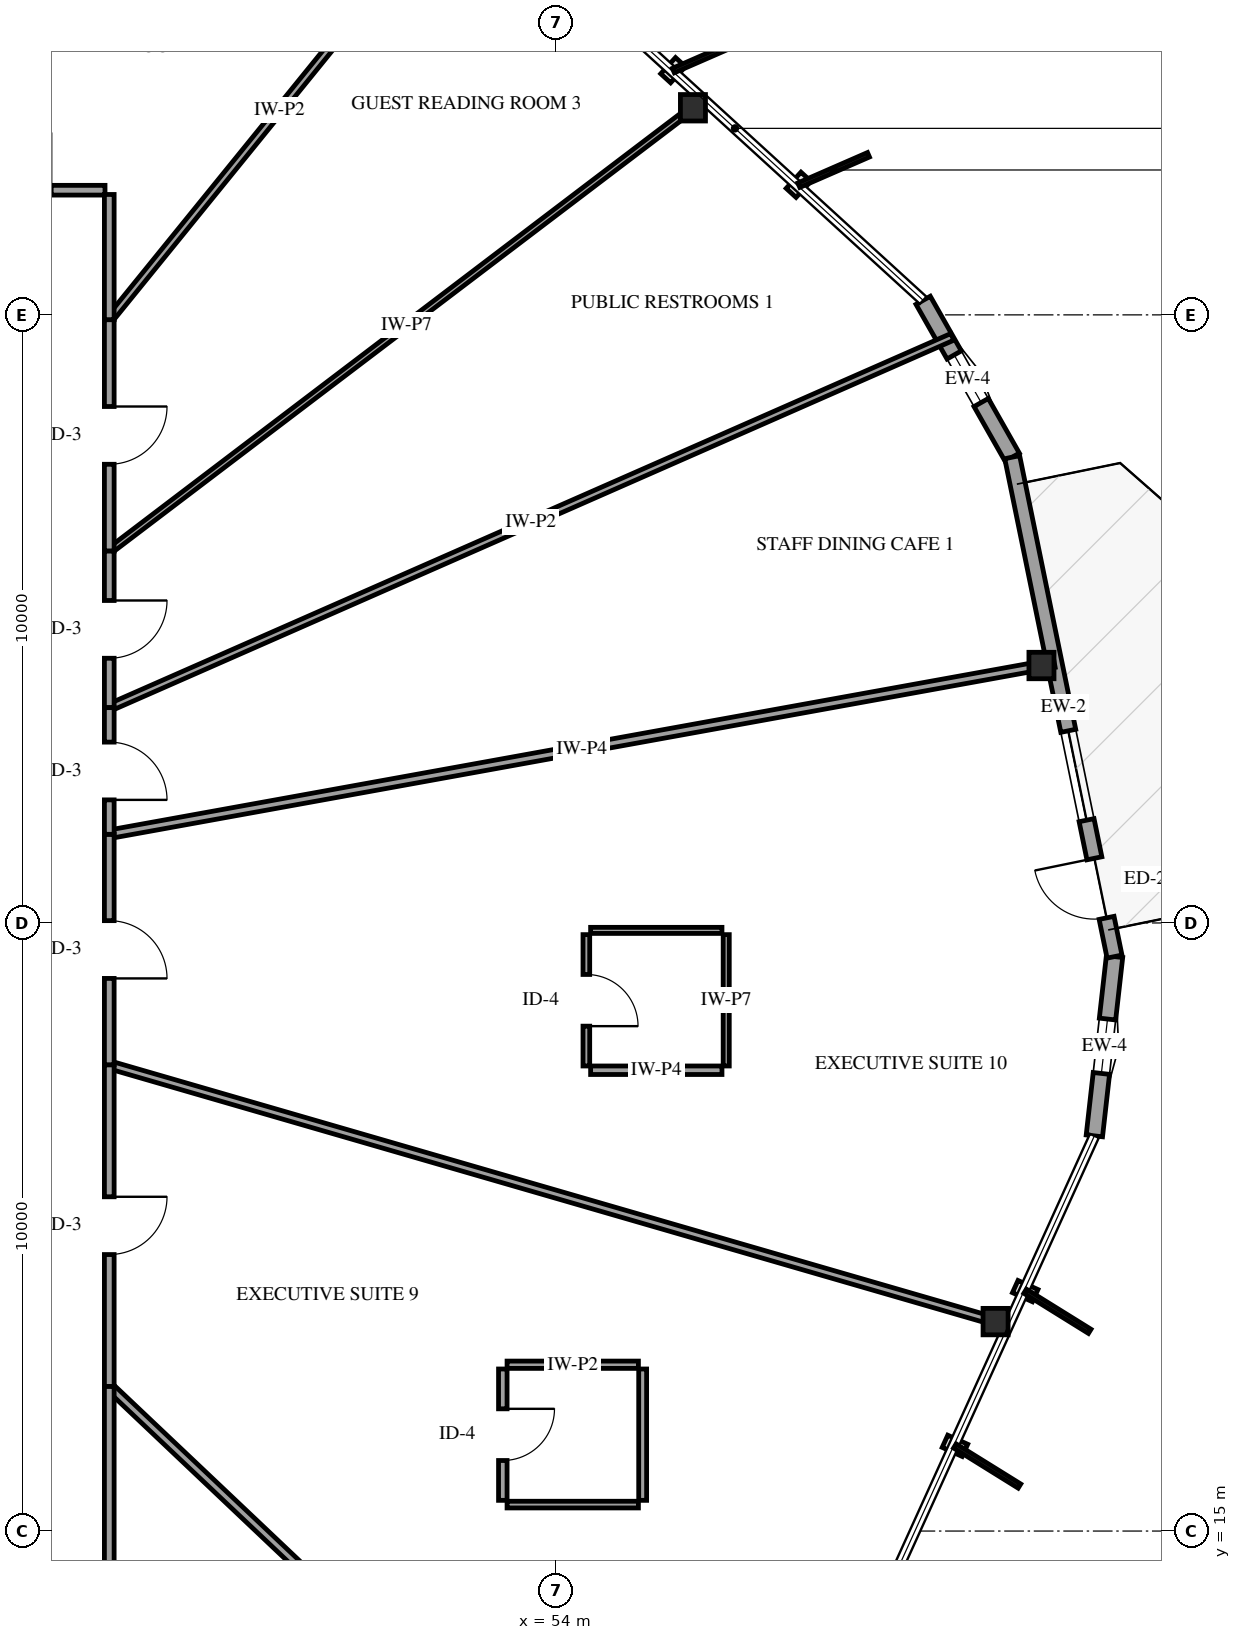
"""IFC4 building model, lengths in metres.
Left out: names, types, materials, properties, quantities, classifications, styles, units other than length and angle.
Written with IfcOpenShell. Run it as: python <this file> out.ifc"""

import sys

from ifc_helpers import new_model, si_unit, direction, frame, frame_2d, origin, origin_2d, place, context, subcontext, project, spatial, rectangle, i_section, extrude, element, fill, save


model = new_model("IFC4")
c1 = context("Model", 3, precision=1e-05, world=origin(), true_north=direction((0.0, 1.0)))
c2 = subcontext(c1, "Body", "Model", "MODEL_VIEW")
j1 = project(units=[si_unit("LENGTHUNIT", "METRE"), si_unit("PLANEANGLEUNIT", "RADIAN")], contexts=[c1])
p1 = place(None, origin())
s1 = spatial("IfcSite", under=j1, at=p1, CompositionType="ELEMENT")
p2 = place(p1, origin())
s2 = spatial("IfcBuilding", under=s1, at=p2, CompositionType="ELEMENT")
p3 = place(p2, frame((0.0, 0.0, 142.6)))
s3 = spatial("IfcBuildingStorey", under=s2, at=p3, CompositionType="ELEMENT", Elevation=142.6)
for number, where, z_axis, x_axis in (
    (1, (61.98, 29.234, 0.0), (0.0, 0.0, 1.0), (1.0, 0.0, 0.0)),
    (2, (56.249, 38.406, 0.0), (0.0, 0.0, 1.0), (1.0, 0.0, 0.0)),
    (3, (61.226, 18.444, 0.0), (0.0, 0.0, 1.0), (1.0, 0.0, 0.0)),
):
    element("IfcColumn", number, at=place(p3, frame(where, z_axis=z_axis, x_axis=x_axis)), inside=s3, PredefinedType="COLUMN", context=c2, shape_type="SweptSolid", body=[
        extrude(i_section(OverallWidth=0.412, OverallDepth=0.435, WebThickness=0.036, FlangeThickness=0.057, FilletRadius=0.038, at=origin_2d()), origin(), (0.0, 0.0, 1.0), 3.6),
    ])
p4 = place(p3, frame((62.85, 21.499, 0.0), z_axis=(0.0, 0.0, 1.0), x_axis=(0.111840485986, 0.993726172391, 0.0)))
e4 = element("IfcWall", 4, at=p4, inside=s3, PredefinedType="SOLIDWALL", context=c2, shape_type="SweptSolid", body=[
    extrude(rectangle(XDim=2.967, YDim=0.27, at=frame_2d((1.483, 0.0))), origin(), (0.0, 0.0, 1.0), 2.679),
])
p5 = place(p4, frame((1.033, 0.0, 0.75)))
e5 = element("IfcOpeningElement", 5, at=p5, cuts=e4, PredefinedType="OPENING", context=c2, shape_type="SweptSolid", body=[
    extrude(rectangle(XDim=0.9, YDim=1.5, at=frame_2d((0.45, 0.75))), frame((0.0, 0.145, 0.0), z_axis=(0.0, -1.0, 0.0), x_axis=(1.0, 0.0, 0.0)), (0.0, 0.0, 1.0), 0.29),
])
p6 = place(p3, frame((61.499, 32.66, 0.0), z_axis=(0.0, 0.0, 1.0), x_axis=(-0.493637484398, 0.869667772196, 0.0)))
e6 = element("IfcWall", 6, at=p6, inside=s3, PredefinedType="SOLIDWALL", context=c2, shape_type="SweptSolid", body=[
    extrude(rectangle(XDim=2.967, YDim=0.27, at=frame_2d((1.483, 0.0))), origin(), (0.0, 0.0, 1.0), 2.679),
])
p7 = place(p6, frame((1.033, 0.0, 0.75)))
e7 = element("IfcOpeningElement", 7, at=p7, cuts=e6, PredefinedType="OPENING", context=c2, shape_type="SweptSolid", body=[
    extrude(rectangle(XDim=0.9, YDim=1.5, at=frame_2d((0.45, 0.75))), frame((0.0, 0.145, 0.0), z_axis=(0.0, -1.0, 0.0), x_axis=(1.0, 0.0, 0.0)), (0.0, 0.0, 1.0), 0.29),
])
p8 = place(p3, frame((63.182, 24.447, 0.0), z_axis=(0.0, 0.0, 1.0), x_axis=(-0.200734189033, 0.979645744825, 0.0)))
e8 = element("IfcWall", 8, at=p8, inside=s3, PredefinedType="SOLIDWALL", context=c2, shape_type="SweptSolid", body=[
    extrude(rectangle(XDim=8.384, YDim=0.25, at=frame_2d((4.192, 0.0))), origin(), (0.0, 0.0, 1.0), 2.679),
])
p9 = place(p8, frame((0.65, 0.0, 0.0)))
e9 = element("IfcOpeningElement", 9, at=p9, cuts=e8, PredefinedType="OPENING", context=c2, shape_type="SweptSolid", body=[
    extrude(rectangle(XDim=1.0, YDim=2.15, at=frame_2d((0.5, 1.075))), frame((0.0, 0.135, 0.0), z_axis=(0.0, -1.0, 0.0), x_axis=(1.0, 0.0, 0.0)), (0.0, 0.0, 1.0), 0.27),
])
p10 = place(p8, frame((2.29, 0.0, 0.72)))
e10 = element("IfcOpeningElement", 10, at=p10, cuts=e8, PredefinedType="OPENING", context=c2, shape_type="SweptSolid", body=[
    extrude(rectangle(XDim=1.5, YDim=1.7, at=frame_2d((0.75, 0.85))), frame((0.0, 0.135, 0.0), z_axis=(0.0, -1.0, 0.0), x_axis=(1.0, 0.0, 0.0)), (0.0, 0.0, 1.0), 0.27),
])
p11 = place(p3, frame((62.193, 29.272, 0.0), z_axis=(0.0, 0.0, 1.0), x_axis=(-0.98400416062, -0.178145479546, 0.0)))
e11 = element("IfcWall", 11, at=p11, inside=s3, PredefinedType="PARTITIONING", context=c2, shape_type="SweptSolid", body=[
    extrude(rectangle(XDim=15.796, YDim=0.14, at=frame_2d((7.898, 0.0))), origin(), (0.0, 0.0, 1.0), 2.595),
])
p12 = place(p3, frame((46.65, 22.668, 0.0), z_axis=(0.0, 0.0, 1.0), x_axis=(0.9604993623, -0.278282185957, 0.0)))
e12 = element("IfcWall", 12, at=p12, inside=s3, PredefinedType="PARTITIONING", context=c2, shape_type="SweptSolid", body=[
    extrude(rectangle(XDim=15.394, YDim=0.13, at=frame_2d((7.697, 0.0))), origin(), (0.0, 0.0, 1.0), 3.3),
])
p13 = place(p3, frame((46.65, 28.541, 0.0), z_axis=(0.0, 0.0, 1.0), x_axis=(0.915393928304, 0.40255925778, 0.0)))
e13 = element("IfcWall", 13, at=p13, inside=s3, PredefinedType="PARTITIONING", context=c2, shape_type="SweptSolid", body=[
    extrude(rectangle(XDim=15.146, YDim=0.12, at=frame_2d((7.573, 0.0))), origin(), (0.0, 0.0, 1.0), 3.3),
])
p14 = place(p3, frame((46.65, 31.115, 0.0), z_axis=(0.0, 0.0, 1.0), x_axis=(0.796330811918, 0.60486133782, 0.0)))
e14 = element("IfcWall", 14, at=p14, inside=s3, PredefinedType="PARTITIONING", context=c2, shape_type="SweptSolid", body=[
    extrude(rectangle(XDim=12.274, YDim=0.1, at=frame_2d((6.137, 0.0))), origin(), (0.0, 0.0, 1.0), 3.3),
])
p15 = place(p3, frame((46.65, 17.377, 0.0), z_axis=(0.0, 0.0, 1.0), x_axis=(0.726191917905, -0.687492035132, 0.0)))
e15 = element("IfcWall", 15, at=p15, inside=s3, PredefinedType="PARTITIONING", context=c2, shape_type="SweptSolid", body=[
    extrude(rectangle(XDim=10.725, YDim=0.14, at=frame_2d((5.362, 0.0))), origin(), (0.0, 0.0, 1.0), 2.595),
])
p16 = place(p3, frame((46.65, 34.921, 0.0), z_axis=(0.0, 0.0, 1.0), x_axis=(0.630130936526, 0.776488894211, 0.0)))
e16 = element("IfcWall", 16, at=p16, inside=s3, PredefinedType="PARTITIONING", context=c2, shape_type="SweptSolid", body=[
    extrude(rectangle(XDim=8.881, YDim=0.12, at=frame_2d((4.44, 0.0))), origin(), (0.0, 0.0, 1.0), 2.678),
])
p17 = place(p3, frame((43.86, 37.05, 0.0), z_axis=(0.0, 0.0, 1.0), x_axis=(0.400047313653, 0.916494488166, 0.0)))
e17 = element("IfcWall", 17, at=p17, inside=s3, PredefinedType="PARTITIONING", context=c2, shape_type="SweptSolid", body=[
    extrude(rectangle(XDim=6.127, YDim=0.14, at=frame_2d((3.063, 0.0))), origin(), (0.0, 0.0, 1.0), 2.595),
])
p18 = place(p3, frame((46.65, 22.668, 0.0), z_axis=(0.0, 0.0, 1.0), x_axis=(0.0, -1.0, 0.0)))
e18 = element("IfcWall", 18, at=p18, inside=s3, PredefinedType="PARTITIONING", context=c2, shape_type="SweptSolid", body=[
    extrude(rectangle(XDim=5.291, YDim=0.16, at=frame_2d((2.646, 0.0))), origin(), (0.0, 0.0, 1.0), 3.3),
])
p19 = place(p18, frame((2.171, 0.0, 0.0)))
e19 = element("IfcOpeningElement", 19, at=p19, cuts=e18, PredefinedType="OPENING", context=c2, shape_type="SweptSolid", body=[
    extrude(rectangle(XDim=0.95, YDim=2.15, at=frame_2d((0.475, 1.075))), frame((0.0, 0.09, 0.0), z_axis=(0.0, -1.0, 0.0), x_axis=(1.0, 0.0, 0.0)), (0.0, 0.0, 1.0), 0.18),
])
p20 = place(p3, frame((46.65, 17.377, 0.0), z_axis=(0.0, 0.0, 1.0), x_axis=(0.0, -1.0, 0.0)))
e20 = element("IfcWall", 20, at=p20, inside=s3, PredefinedType="PARTITIONING", context=c2, shape_type="SweptSolid", body=[
    extrude(rectangle(XDim=4.357, YDim=0.16, at=frame_2d((2.178, 0.0))), origin(), (0.0, 0.0, 1.0), 3.3),
])
p21 = place(p3, frame((46.65, 34.921, 0.0), z_axis=(0.0, 0.0, 1.0), x_axis=(0.0, -1.0, 0.0)))
e21 = element("IfcWall", 21, at=p21, inside=s3, PredefinedType="PARTITIONING", context=c2, shape_type="SweptSolid", body=[
    extrude(rectangle(XDim=3.806, YDim=0.16, at=frame_2d((1.903, 0.0))), origin(), (0.0, 0.0, 1.0), 3.3),
])
p22 = place(p21, frame((1.428, 0.0, 0.0)))
e22 = element("IfcOpeningElement", 22, at=p22, cuts=e21, PredefinedType="OPENING", context=c2, shape_type="SweptSolid", body=[
    extrude(rectangle(XDim=0.95, YDim=2.15, at=frame_2d((0.475, 1.075))), frame((0.0, 0.09, 0.0), z_axis=(0.0, -1.0, 0.0), x_axis=(1.0, 0.0, 0.0)), (0.0, 0.0, 1.0), 0.18),
])
p23 = place(p3, frame((46.65, 26.458, 0.0), z_axis=(0.0, 0.0, 1.0), x_axis=(0.0, -1.0, 0.0)))
e23 = element("IfcWall", 23, at=p23, inside=s3, PredefinedType="PARTITIONING", context=c2, shape_type="SweptSolid", body=[
    extrude(rectangle(XDim=3.79, YDim=0.16, at=frame_2d((1.895, 0.0))), origin(), (0.0, 0.0, 1.0), 3.3),
])
p24 = place(p23, frame((1.42, 0.0, 0.0)))
e24 = element("IfcOpeningElement", 24, at=p24, cuts=e23, PredefinedType="OPENING", context=c2, shape_type="SweptSolid", body=[
    extrude(rectangle(XDim=0.95, YDim=2.15, at=frame_2d((0.475, 1.075))), frame((0.0, 0.09, 0.0), z_axis=(0.0, -1.0, 0.0), x_axis=(1.0, 0.0, 0.0)), (0.0, 0.0, 1.0), 0.18),
])
p25 = place(p3, frame((43.86, 37.05, 0.0), z_axis=(0.0, 0.0, 1.0), x_axis=(1.0, 0.0, 0.0)))
e25 = element("IfcWall", 25, at=p25, inside=s3, PredefinedType="PARTITIONING", context=c2, shape_type="SweptSolid", body=[
    extrude(rectangle(XDim=2.72, YDim=0.16, at=frame_2d((1.36, 0.0))), origin(), (0.0, 0.0, 1.0), 3.3),
])
p26 = place(p25, frame((0.885, 0.0, 0.0)))
e26 = element("IfcOpeningElement", 26, at=p26, cuts=e25, PredefinedType="OPENING", context=c2, shape_type="SweptSolid", body=[
    extrude(rectangle(XDim=0.95, YDim=2.15, at=frame_2d((0.475, 1.075))), frame((0.0, 0.09, 0.0), z_axis=(0.0, -1.0, 0.0), x_axis=(1.0, 0.0, 0.0)), (0.0, 0.0, 1.0), 0.18),
])
p27 = place(p3, frame((46.65, 31.115, 0.0), z_axis=(0.0, 0.0, 1.0), x_axis=(0.0, -1.0, 0.0)))
e27 = element("IfcWall", 27, at=p27, inside=s3, PredefinedType="PARTITIONING", context=c2, shape_type="SweptSolid", body=[
    extrude(rectangle(XDim=2.574, YDim=0.16, at=frame_2d((1.287, 0.0))), origin(), (0.0, 0.0, 1.0), 3.3),
])
p28 = place(p27, frame((0.812, 0.0, 0.0)))
e28 = element("IfcOpeningElement", 28, at=p28, cuts=e27, PredefinedType="OPENING", context=c2, shape_type="SweptSolid", body=[
    extrude(rectangle(XDim=0.95, YDim=2.15, at=frame_2d((0.475, 1.075))), frame((0.0, 0.09, 0.0), z_axis=(0.0, -1.0, 0.0), x_axis=(1.0, 0.0, 0.0)), (0.0, 0.0, 1.0), 0.18),
])
p29 = place(p3, frame((54.496, 24.808, 0.0), z_axis=(0.0, 0.0, 1.0), x_axis=(0.0, -1.0, 0.0)))
e29 = element("IfcWall", 29, at=p29, inside=s3, PredefinedType="PARTITIONING", context=c2, shape_type="SweptSolid", body=[
    extrude(rectangle(XDim=2.16, YDim=0.11, at=frame_2d((1.08, 0.0))), origin(), (0.0, 0.0, 1.0), 3.3),
])
p30 = place(p29, frame((0.655, 0.0, 0.0)))
e30 = element("IfcOpeningElement", 30, at=p30, cuts=e29, PredefinedType="OPENING", context=c2, shape_type="SweptSolid", body=[
    extrude(rectangle(XDim=0.85, YDim=2.1, at=frame_2d((0.425, 1.05))), frame((0.0, 0.065, 0.0), z_axis=(0.0, -1.0, 0.0), x_axis=(1.0, 0.0, 0.0)), (0.0, 0.0, 1.0), 0.13),
])
p31 = place(p3, frame((56.796, 22.648, 0.0), z_axis=(0.0, 0.0, 1.0), x_axis=(0.0, 1.0, 0.0)))
e31 = element("IfcWall", 31, at=p31, inside=s3, PredefinedType="PARTITIONING", context=c2, shape_type="SweptSolid", body=[
    extrude(rectangle(XDim=2.16, YDim=0.1, at=frame_2d((1.08, 0.0))), origin(), (0.0, 0.0, 1.0), 3.3),
])
p32 = place(p3, frame((53.122, 17.665, 0.0), z_axis=(0.0, 0.0, 1.0), x_axis=(0.0, -1.0, 0.0)))
e32 = element("IfcWall", 32, at=p32, inside=s3, PredefinedType="PARTITIONING", context=c2, shape_type="SweptSolid", body=[
    extrude(rectangle(XDim=2.16, YDim=0.14, at=frame_2d((1.08, 0.0))), origin(), (0.0, 0.0, 1.0), 3.3),
])
p33 = place(p32, frame((0.655, 0.0, 0.0)))
e33 = element("IfcOpeningElement", 33, at=p33, cuts=e32, PredefinedType="OPENING", context=c2, shape_type="SweptSolid", body=[
    extrude(rectangle(XDim=0.85, YDim=2.1, at=frame_2d((0.425, 1.05))), frame((0.0, 0.08, 0.0), z_axis=(0.0, -1.0, 0.0), x_axis=(1.0, 0.0, 0.0)), (0.0, 0.0, 1.0), 0.16),
])
p34 = place(p3, frame((55.422, 15.505, 0.0), z_axis=(0.0, 0.0, 1.0), x_axis=(0.0, 1.0, 0.0)))
e34 = element("IfcWall", 34, at=p34, inside=s3, PredefinedType="PARTITIONING", context=c2, shape_type="SweptSolid", body=[
    extrude(rectangle(XDim=2.16, YDim=0.13, at=frame_2d((1.08, 0.0))), origin(), (0.0, 0.0, 1.0), 3.3),
])
p35 = place(p3, frame((55.352, 17.735, 0.0), z_axis=(0.0, 0.0, 1.0), x_axis=(-1.0, 0.0, 0.0)))
e35 = element("IfcWall", 35, at=p35, inside=s3, PredefinedType="PARTITIONING", context=c2, shape_type="SweptSolid", body=[
    extrude(rectangle(XDim=2.16, YDim=0.12, at=frame_2d((1.08, 0.0))), origin(), (0.0, 0.0, 1.0), 3.3),
])
p36 = place(p3, frame((53.192, 15.435, 0.0), z_axis=(0.0, 0.0, 1.0), x_axis=(1.0, 0.0, 0.0)))
e36 = element("IfcWall", 36, at=p36, inside=s3, PredefinedType="PARTITIONING", context=c2, shape_type="SweptSolid", body=[
    extrude(rectangle(XDim=2.16, YDim=0.11, at=frame_2d((1.08, 0.0))), origin(), (0.0, 0.0, 1.0), 3.3),
])
p37 = place(p3, frame((56.726, 24.878, 0.0), z_axis=(0.0, 0.0, 1.0), x_axis=(-1.0, 0.0, 0.0)))
e37 = element("IfcWall", 37, at=p37, inside=s3, PredefinedType="PARTITIONING", context=c2, shape_type="SweptSolid", body=[
    extrude(rectangle(XDim=2.16, YDim=0.1, at=frame_2d((1.08, 0.0))), origin(), (0.0, 0.0, 1.0), 3.3),
])
p38 = place(p3, frame((54.566, 22.578, 0.0), z_axis=(0.0, 0.0, 1.0), x_axis=(1.0, 0.0, 0.0)))
e38 = element("IfcWall", 38, at=p38, inside=s3, PredefinedType="PARTITIONING", context=c2, shape_type="SweptSolid", body=[
    extrude(rectangle(XDim=2.16, YDim=0.14, at=frame_2d((1.08, 0.0))), origin(), (0.0, 0.0, 1.0), 3.3),
])
p39 = place(p3, frame((46.65, 28.541, 0.0), z_axis=(0.0, 0.0, 1.0), x_axis=(0.0, -1.0, 0.0)))
e39 = element("IfcWall", 39, at=p39, inside=s3, PredefinedType="PARTITIONING", context=c2, shape_type="SweptSolid", body=[
    extrude(rectangle(XDim=2.083, YDim=0.16, at=frame_2d((1.042, 0.0))), origin(), (0.0, 0.0, 1.0), 3.3),
])
p40 = place(p39, frame((0.567, 0.0, 0.0)))
e40 = element("IfcOpeningElement", 40, at=p40, cuts=e39, PredefinedType="OPENING", context=c2, shape_type="SweptSolid", body=[
    extrude(rectangle(XDim=0.95, YDim=2.15, at=frame_2d((0.475, 1.075))), frame((0.0, 0.09, 0.0), z_axis=(0.0, -1.0, 0.0), x_axis=(1.0, 0.0, 0.0)), (0.0, 0.0, 1.0), 0.18),
])
p41 = place(p3, frame((46.65, 36.98, 0.0), z_axis=(0.0, 0.0, 1.0), x_axis=(0.0, -1.0, 0.0)))
e41 = element("IfcWall", 41, at=p41, inside=s3, PredefinedType="PARTITIONING", context=c2, shape_type="SweptSolid", body=[
    extrude(rectangle(XDim=2.059, YDim=0.16, at=frame_2d((1.03, 0.0))), origin(), (0.0, 0.0, 1.0), 3.3),
])
p42 = place(p5, origin())
e42 = element("IfcWindow", 42, at=p42, inside=s3, PartitioningType="SINGLE_PANEL", PredefinedType="WINDOW", context=c2, shape_type="SweptSolid", body=[
    extrude(rectangle(XDim=0.9, YDim=1.5, at=frame_2d((0.45, 0.75))), frame((0.0, 0.03, 0.0), z_axis=(0.0, -1.0, 0.0), x_axis=(1.0, 0.0, 0.0)), (0.0, 0.0, 1.0), 0.06),
])
fill(e5, e42)
p43 = place(p7, origin())
e43 = element("IfcWindow", 43, at=p43, inside=s3, PartitioningType="SINGLE_PANEL", PredefinedType="WINDOW", context=c2, shape_type="SweptSolid", body=[
    extrude(rectangle(XDim=0.9, YDim=1.5, at=frame_2d((0.45, 0.75))), frame((0.0, 0.03, 0.0), z_axis=(0.0, -1.0, 0.0), x_axis=(1.0, 0.0, 0.0)), (0.0, 0.0, 1.0), 0.06),
])
fill(e7, e43)
p44 = place(p9, origin())
e44 = element("IfcDoor", 44, at=p44, inside=s3, OperationType="SINGLE_SWING_RIGHT", PredefinedType="DOOR", context=c2, shape_type="SweptSolid", body=[
    extrude(rectangle(XDim=1.0, YDim=2.15, at=frame_2d((0.5, 1.075))), frame((0.0, 0.025, 0.0), z_axis=(0.0, -1.0, 0.0), x_axis=(1.0, 0.0, 0.0)), (0.0, 0.0, 1.0), 0.05),
])
fill(e9, e44)
p45 = place(p10, origin())
e45 = element("IfcWindow", 45, at=p45, inside=s3, PartitioningType="SINGLE_PANEL", PredefinedType="WINDOW", context=c2, shape_type="SweptSolid", body=[
    extrude(rectangle(XDim=1.5, YDim=1.7, at=frame_2d((0.75, 0.85))), frame((0.0, 0.03, 0.0), z_axis=(0.0, -1.0, 0.0), x_axis=(1.0, 0.0, 0.0)), (0.0, 0.0, 1.0), 0.06),
])
fill(e10, e45)
p46 = place(p19, origin())
e46 = element("IfcDoor", 46, at=p46, inside=s3, OperationType="SINGLE_SWING_LEFT", PredefinedType="DOOR", context=c2, shape_type="SweptSolid", body=[
    extrude(rectangle(XDim=0.95, YDim=2.15, at=frame_2d((0.475, 1.075))), frame((0.0, 0.025, 0.0), z_axis=(0.0, -1.0, 0.0), x_axis=(1.0, 0.0, 0.0)), (0.0, 0.0, 1.0), 0.05),
])
fill(e19, e46)
p47 = place(p22, origin())
e47 = element("IfcDoor", 47, at=p47, inside=s3, OperationType="SINGLE_SWING_LEFT", PredefinedType="DOOR", context=c2, shape_type="SweptSolid", body=[
    extrude(rectangle(XDim=0.95, YDim=2.15, at=frame_2d((0.475, 1.075))), frame((0.0, 0.025, 0.0), z_axis=(0.0, -1.0, 0.0), x_axis=(1.0, 0.0, 0.0)), (0.0, 0.0, 1.0), 0.05),
])
fill(e22, e47)
p48 = place(p24, origin())
e48 = element("IfcDoor", 48, at=p48, inside=s3, OperationType="SINGLE_SWING_RIGHT", PredefinedType="DOOR", context=c2, shape_type="SweptSolid", body=[
    extrude(rectangle(XDim=0.95, YDim=2.15, at=frame_2d((0.475, 1.075))), frame((0.0, 0.025, 0.0), z_axis=(0.0, -1.0, 0.0), x_axis=(1.0, 0.0, 0.0)), (0.0, 0.0, 1.0), 0.05),
])
fill(e24, e48)
p49 = place(p28, origin())
e49 = element("IfcDoor", 49, at=p49, inside=s3, OperationType="SINGLE_SWING_LEFT", PredefinedType="DOOR", context=c2, shape_type="SweptSolid", body=[
    extrude(rectangle(XDim=0.95, YDim=2.15, at=frame_2d((0.475, 1.075))), frame((0.0, 0.025, 0.0), z_axis=(0.0, -1.0, 0.0), x_axis=(1.0, 0.0, 0.0)), (0.0, 0.0, 1.0), 0.05),
])
fill(e28, e49)
p50 = place(p30, origin())
e50 = element("IfcDoor", 50, at=p50, inside=s3, OperationType="SINGLE_SWING_RIGHT", PredefinedType="DOOR", context=c2, shape_type="SweptSolid", body=[
    extrude(rectangle(XDim=0.85, YDim=2.1, at=frame_2d((0.425, 1.05))), frame((0.0, 0.025, 0.0), z_axis=(0.0, -1.0, 0.0), x_axis=(1.0, 0.0, 0.0)), (0.0, 0.0, 1.0), 0.05),
])
fill(e30, e50)
p51 = place(p33, origin())
e51 = element("IfcDoor", 51, at=p51, inside=s3, OperationType="SINGLE_SWING_LEFT", PredefinedType="DOOR", context=c2, shape_type="SweptSolid", body=[
    extrude(rectangle(XDim=0.85, YDim=2.1, at=frame_2d((0.425, 1.05))), frame((0.0, 0.025, 0.0), z_axis=(0.0, -1.0, 0.0), x_axis=(1.0, 0.0, 0.0)), (0.0, 0.0, 1.0), 0.05),
])
fill(e33, e51)
p52 = place(p40, origin())
e52 = element("IfcDoor", 52, at=p52, inside=s3, OperationType="SINGLE_SWING_RIGHT", PredefinedType="DOOR", context=c2, shape_type="SweptSolid", body=[
    extrude(rectangle(XDim=0.95, YDim=2.15, at=frame_2d((0.475, 1.075))), frame((0.0, 0.025, 0.0), z_axis=(0.0, -1.0, 0.0), x_axis=(1.0, 0.0, 0.0)), (0.0, 0.0, 1.0), 0.05),
])
fill(e40, e52)
save(model, sys.argv[1])
